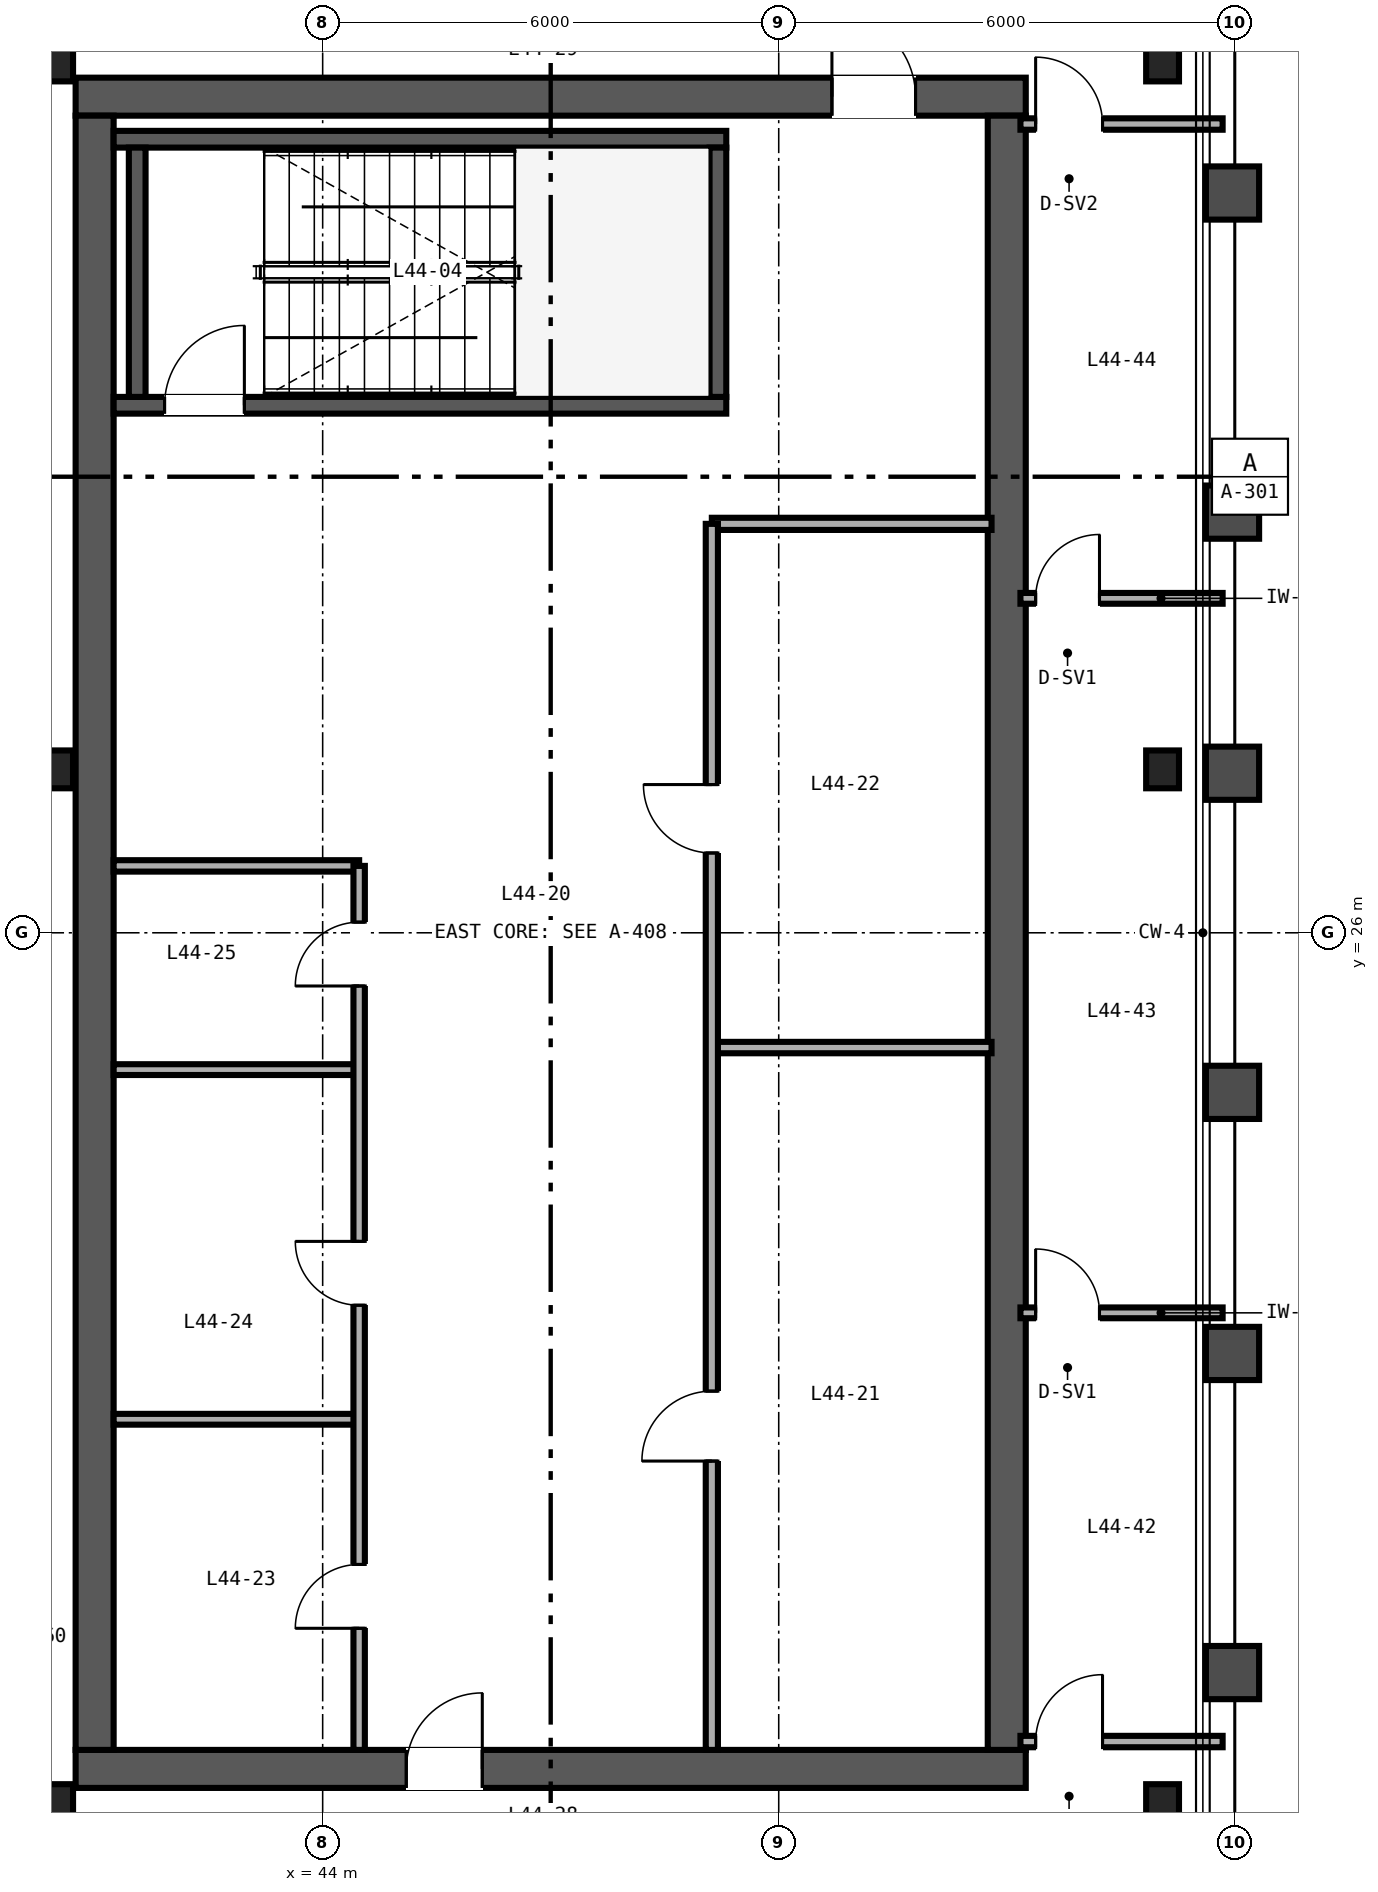
"""IFC4 building model, lengths in metres.
Left out: names, types, materials, properties, quantities, classifications, styles, units other than length and angle.
Written with IfcOpenShell. Run it as: python <this file> out.ifc"""

import sys

from ifc_helpers import new_model, si_unit, direction, frame, frame_2d, origin, origin_2d, place, context, subcontext, project, spatial, rectangle, i_section, extrude, source, transform, mapped, element, fill, save


model = new_model("IFC4")
c1 = context("Model", 3, precision=1e-05, world=origin(), true_north=direction((0.0, 1.0)))
c2 = subcontext(c1, "Body", "Model", "MODEL_VIEW")
j1 = project(units=[si_unit("LENGTHUNIT", "METRE"), si_unit("PLANEANGLEUNIT", "RADIAN")], contexts=[c1])
p1 = place(None, origin())
s1 = spatial("IfcSite", under=j1, at=p1, CompositionType="ELEMENT")
p2 = place(p1, origin())
s2 = spatial("IfcBuilding", under=s1, at=p2, CompositionType="ELEMENT")
p3 = place(p2, frame((0.0, 0.0, 177.6)))
s3 = spatial("IfcBuildingStorey", under=s2, at=p3, CompositionType="ELEMENT", Elevation=177.6)
p4 = place(p3, frame((40.75, 15.0, 0.0), z_axis=(0.0, 0.0, 1.0), x_axis=(1.0, 0.0, 0.0)))
e1 = element("IfcWall", 1, at=p4, inside=s3, PredefinedType="SHEAR", context=c2, shape_type="SweptSolid", body=[
    extrude(rectangle(XDim=12.5, YDim=0.5, at=frame_2d((6.25, 0.0))), origin(), (0.0, 0.0, 1.0), 3.37),
])
p5 = place(p4, frame((4.35, 0.0, 0.0)))
e2 = element("IfcOpeningElement", 2, at=p5, cuts=e1, PredefinedType="OPENING", context=c2, shape_type="SweptSolid", body=[
    extrude(rectangle(XDim=1.0, YDim=2.15, at=frame_2d((0.5, 1.075))), frame((0.0, 0.26, 0.0), z_axis=(0.0, -1.0, 0.0), x_axis=(1.0, 0.0, 0.0)), (0.0, 0.0, 1.0), 0.52),
])
p6 = place(p3, frame((40.75, 37.0, 0.0), z_axis=(0.0, 0.0, 1.0), x_axis=(1.0, 0.0, 0.0)))
e3 = element("IfcWall", 3, at=p6, inside=s3, PredefinedType="SHEAR", context=c2, shape_type="SweptSolid", body=[
    extrude(rectangle(XDim=12.5, YDim=0.5, at=frame_2d((6.25, 0.0))), origin(), (0.0, 0.0, 1.0), 3.37),
])
p7 = place(p6, frame((9.95, 0.0, 0.0)))
e4 = element("IfcOpeningElement", 4, at=p7, cuts=e3, PredefinedType="OPENING", context=c2, shape_type="SweptSolid", body=[
    extrude(rectangle(XDim=1.1, YDim=2.15, at=frame_2d((0.55, 1.075))), frame((0.0, 0.26, 0.0), z_axis=(0.0, -1.0, 0.0), x_axis=(1.0, 0.0, 0.0)), (0.0, 0.0, 1.0), 0.52),
])
for number, where, z_axis, x_axis in (
    (5, (41.0, 15.25, 0.0), (0.0, 0.0, 1.0), (0.0, 1.0, 0.0)),
    (6, (53.0, 15.25, 0.0), (0.0, 0.0, 1.0), (0.0, 1.0, 0.0)),
):
    element("IfcWall", number, at=place(p3, frame(where, z_axis=z_axis, x_axis=x_axis)), inside=s3, PredefinedType="SHEAR", context=c2, shape_type="SweptSolid", body=[
        extrude(rectangle(XDim=21.5, YDim=0.5, at=frame_2d((10.75, 0.0))), origin(), (0.0, 0.0, 1.0), 3.37),
    ])
p8 = place(p3, frame((41.25, 32.94, 0.0), z_axis=(0.0, 0.0, 1.0), x_axis=(1.0, 0.0, 0.0)))
e7 = element("IfcWall", 7, at=p8, inside=s3, PredefinedType="SHEAR", context=c2, shape_type="SweptSolid", body=[
    extrude(rectangle(XDim=8.06, YDim=0.22, at=frame_2d((4.03, 0.0))), origin(), (0.0, 0.0, 1.0), 3.4),
])
p9 = place(p8, frame((0.67, 0.0, 0.0)))
e8 = element("IfcOpeningElement", 8, at=p9, cuts=e7, PredefinedType="OPENING", context=c2, shape_type="SweptSolid", body=[
    extrude(rectangle(XDim=1.05, YDim=2.15, at=frame_2d((0.525, 1.075))), frame((0.0, 0.12, 0.0), z_axis=(0.0, -1.0, 0.0), x_axis=(1.0, 0.0, 0.0)), (0.0, 0.0, 1.0), 0.24),
])
p10 = place(p3, frame((41.25, 36.44, 0.0), z_axis=(0.0, 0.0, 1.0), x_axis=(1.0, 0.0, 0.0)))
e9 = element("IfcWall", 9, at=p10, inside=s3, PredefinedType="SHEAR", context=c2, shape_type="SweptSolid", body=[
    extrude(rectangle(XDim=8.06, YDim=0.22, at=frame_2d((4.03, 0.0))), origin(), (0.0, 0.0, 1.0), 3.4),
])
for number, where, z_axis, x_axis in (
    (10, (41.56, 33.05, 0.0), (0.0, 0.0, 1.0), (0.0, 1.0, 0.0)),
    (11, (49.2, 33.05, 0.0), (0.0, 0.0, 1.0), (0.0, 1.0, 0.0)),
):
    element("IfcWall", number, at=place(p3, frame(where, z_axis=z_axis, x_axis=x_axis)), inside=s3, PredefinedType="SHEAR", context=c2, shape_type="SweptSolid", body=[
        extrude(rectangle(XDim=3.28, YDim=0.22, at=frame_2d((1.64, 0.0))), origin(), (0.0, 0.0, 1.0), 3.4),
    ])
m1 = source(origin(), c2, "Body", "SweptSolid", [
    extrude(i_section(OverallWidth=0.432, OverallDepth=0.498, WebThickness=0.056, FlangeThickness=0.089, FilletRadius=0.025, at=origin_2d()), origin(), (0.0, 0.0, 1.0), 3.37),
])
for number, where, z_axis, x_axis in (
    (12, (40.5, 14.55, 0.0), (0.0, 0.0, 1.0), (1.0, 0.0, 0.0)),
    (13, (55.05, 14.55, 0.0), (0.0, 0.0, 1.0), (1.0, 0.0, 0.0)),
    (14, (40.5, 28.15, 0.0), (0.0, 0.0, 1.0), (1.0, 0.0, 0.0)),
    (15, (55.05, 28.15, 0.0), (0.0, 0.0, 1.0), (1.0, 0.0, 0.0)),
    (16, (40.5, 37.45, 0.0), (0.0, 0.0, 1.0), (1.0, 0.0, 0.0)),
    (17, (55.05, 37.45, 0.0), (0.0, 0.0, 1.0), (1.0, 0.0, 0.0)),
):
    element("IfcColumn", number, at=place(p3, frame(where, z_axis=z_axis, x_axis=x_axis)), inside=s3, PredefinedType="COLUMN", context=c2, shape_type="MappedRepresentation", body=[
        mapped(m1, transform((0.0, 0.0, 0.0), scale=1.0)),
    ])
p11 = place(p3, frame((49.12, 31.38, 0.0), z_axis=(0.0, 0.0, 1.0), x_axis=(1.0, 0.0, 0.0)))
e18 = element("IfcWall", 18, at=p11, inside=s3, PredefinedType="PARTITIONING", context=c2, shape_type="SweptSolid", body=[
    extrude(rectangle(XDim=3.68, YDim=0.16, at=frame_2d((1.84, 0.0))), origin(), (0.0, 0.0, 1.0), 2.47),
])
p12 = place(p3, frame((49.12, 24.49, 0.0), z_axis=(0.0, 0.0, 1.0), x_axis=(1.0, 0.0, 0.0)))
e19 = element("IfcWall", 19, at=p12, inside=s3, PredefinedType="PARTITIONING", context=c2, shape_type="SweptSolid", body=[
    extrude(rectangle(XDim=3.68, YDim=0.15, at=frame_2d((1.84, 0.0))), origin(), (0.0, 0.0, 1.0), 3.37),
])
p13 = place(p3, frame((49.12, 15.25, 0.0), z_axis=(0.0, 0.0, 1.0), x_axis=(0.0, 1.0, 0.0)))
e20 = element("IfcWall", 20, at=p13, inside=s3, PredefinedType="PARTITIONING", context=c2, shape_type="SweptSolid", body=[
    extrude(rectangle(XDim=16.13, YDim=0.16, at=frame_2d((8.065, 0.0))), origin(), (0.0, 0.0, 1.0), 2.443),
])
p14 = place(p13, frame((3.8, 0.0, 0.0)))
e21 = element("IfcOpeningElement", 21, at=p14, cuts=e20, PredefinedType="OPENING", context=c2, shape_type="SweptSolid", body=[
    extrude(rectangle(XDim=0.92, YDim=2.15, at=frame_2d((0.46, 1.075))), frame((0.0, 0.09, 0.0), z_axis=(0.0, -1.0, 0.0), x_axis=(1.0, 0.0, 0.0)), (0.0, 0.0, 1.0), 0.18),
])
p15 = place(p13, frame((11.8, 0.0, 0.0)))
e22 = element("IfcOpeningElement", 22, at=p15, cuts=e20, PredefinedType="OPENING", context=c2, shape_type="SweptSolid", body=[
    extrude(rectangle(XDim=0.9, YDim=2.15, at=frame_2d((0.45, 1.075))), frame((0.0, 0.09, 0.0), z_axis=(0.0, -1.0, 0.0), x_axis=(1.0, 0.0, 0.0)), (0.0, 0.0, 1.0), 0.18),
])
p16 = place(p3, frame((41.25, 26.88, 0.0), z_axis=(0.0, 0.0, 1.0), x_axis=(1.0, 0.0, 0.0)))
e23 = element("IfcWall", 23, at=p16, inside=s3, PredefinedType="PARTITIONING", context=c2, shape_type="SweptSolid", body=[
    extrude(rectangle(XDim=3.23, YDim=0.15, at=frame_2d((1.615, 0.0))), origin(), (0.0, 0.0, 1.0), 3.37),
])
for number, where, z_axis, x_axis in (
    (24, (41.25, 19.6, 0.0), (0.0, 0.0, 1.0), (1.0, 0.0, 0.0)),
    (25, (41.25, 24.2, 0.0), (0.0, 0.0, 1.0), (1.0, 0.0, 0.0)),
):
    element("IfcWall", number, at=place(p3, frame(where, z_axis=z_axis, x_axis=x_axis)), inside=s3, PredefinedType="PARTITIONING", context=c2, shape_type="SweptSolid", body=[
        extrude(rectangle(XDim=3.23, YDim=0.142, at=frame_2d((1.615, 0.0))), origin(), (0.0, 0.0, 1.0), 3.37),
    ])
p17 = place(p3, frame((44.48, 15.25, 0.0), z_axis=(0.0, 0.0, 1.0), x_axis=(0.0, 1.0, 0.0)))
e26 = element("IfcWall", 26, at=p17, inside=s3, PredefinedType="PARTITIONING", context=c2, shape_type="SweptSolid", body=[
    extrude(rectangle(XDim=11.63, YDim=0.15, at=frame_2d((5.815, 0.0))), origin(), (0.0, 0.0, 1.0), 3.37),
])
p18 = place(p17, frame((1.6, 0.0, 0.0)))
e27 = element("IfcOpeningElement", 27, at=p18, cuts=e26, PredefinedType="OPENING", context=c2, shape_type="SweptSolid", body=[
    extrude(rectangle(XDim=0.84, YDim=2.1, at=frame_2d((0.42, 1.05))), frame((0.0, 0.085, 0.0), z_axis=(0.0, -1.0, 0.0), x_axis=(1.0, 0.0, 0.0)), (0.0, 0.0, 1.0), 0.17),
])
p19 = place(p17, frame((5.85, 0.0, 0.0)))
e28 = element("IfcOpeningElement", 28, at=p19, cuts=e26, PredefinedType="OPENING", context=c2, shape_type="SweptSolid", body=[
    extrude(rectangle(XDim=0.84, YDim=2.1, at=frame_2d((0.42, 1.05))), frame((0.0, 0.085, 0.0), z_axis=(0.0, -1.0, 0.0), x_axis=(1.0, 0.0, 0.0)), (0.0, 0.0, 1.0), 0.17),
])
p20 = place(p17, frame((10.05, 0.0, 0.0)))
e29 = element("IfcOpeningElement", 29, at=p20, cuts=e26, PredefinedType="OPENING", context=c2, shape_type="SweptSolid", body=[
    extrude(rectangle(XDim=0.84, YDim=2.1, at=frame_2d((0.42, 1.05))), frame((0.0, 0.085, 0.0), z_axis=(0.0, -1.0, 0.0), x_axis=(1.0, 0.0, 0.0)), (0.0, 0.0, 1.0), 0.17),
])
p21 = place(p3, frame((53.18, 15.36, 0.0), z_axis=(0.0, 0.0, 1.0), x_axis=(1.0, 0.0, 0.0)))
e30 = element("IfcWall", 30, at=p21, inside=s3, PredefinedType="PARTITIONING", context=c2, shape_type="SweptSolid", body=[
    extrude(rectangle(XDim=2.66, YDim=0.15, at=frame_2d((1.33, 0.0))), origin(), (0.0, 0.0, 1.0), 2.591),
])
p22 = place(p21, frame((0.2, 0.0, 0.0)))
e31 = element("IfcOpeningElement", 31, at=p22, cuts=e30, PredefinedType="OPENING", context=c2, shape_type="SweptSolid", body=[
    extrude(rectangle(XDim=0.88, YDim=2.15, at=frame_2d((0.44, 1.075))), frame((0.0, 0.085, 0.0), z_axis=(0.0, -1.0, 0.0), x_axis=(1.0, 0.0, 0.0)), (0.0, 0.0, 1.0), 0.17),
])
p23 = place(p3, frame((53.18, 36.64, 0.0), z_axis=(0.0, 0.0, 1.0), x_axis=(1.0, 0.0, 0.0)))
e32 = element("IfcWall", 32, at=p23, inside=s3, PredefinedType="PARTITIONING", context=c2, shape_type="SweptSolid", body=[
    extrude(rectangle(XDim=2.66, YDim=0.15, at=frame_2d((1.33, 0.0))), origin(), (0.0, 0.0, 1.0), 2.753),
])
p24 = place(p23, frame((0.2, 0.0, 0.0)))
e33 = element("IfcOpeningElement", 33, at=p24, cuts=e32, PredefinedType="OPENING", context=c2, shape_type="SweptSolid", body=[
    extrude(rectangle(XDim=0.88, YDim=2.15, at=frame_2d((0.44, 1.075))), frame((0.0, 0.085, 0.0), z_axis=(0.0, -1.0, 0.0), x_axis=(1.0, 0.0, 0.0)), (0.0, 0.0, 1.0), 0.17),
])
p25 = place(p3, frame((53.18, 21.0, 0.0), z_axis=(0.0, 0.0, 1.0), x_axis=(1.0, 0.0, 0.0)))
e34 = element("IfcWall", 34, at=p25, inside=s3, PredefinedType="PARTITIONING", context=c2, shape_type="SweptSolid", body=[
    extrude(rectangle(XDim=2.66, YDim=0.142, at=frame_2d((1.33, 0.0))), origin(), (0.0, 0.0, 1.0), 2.591),
])
p26 = place(p25, frame((0.2, 0.0, 0.0)))
e35 = element("IfcOpeningElement", 35, at=p26, cuts=e34, PredefinedType="OPENING", context=c2, shape_type="SweptSolid", body=[
    extrude(rectangle(XDim=0.84, YDim=2.1, at=frame_2d((0.42, 1.05))), frame((0.0, 0.081, 0.0), z_axis=(0.0, -1.0, 0.0), x_axis=(1.0, 0.0, 0.0)), (0.0, 0.0, 1.0), 0.162),
])
p27 = place(p3, frame((53.18, 30.4, 0.0), z_axis=(0.0, 0.0, 1.0), x_axis=(1.0, 0.0, 0.0)))
e36 = element("IfcWall", 36, at=p27, inside=s3, PredefinedType="PARTITIONING", context=c2, shape_type="SweptSolid", body=[
    extrude(rectangle(XDim=2.66, YDim=0.142, at=frame_2d((1.33, 0.0))), origin(), (0.0, 0.0, 1.0), 2.753),
])
p28 = place(p27, frame((0.2, 0.0, 0.0)))
e37 = element("IfcOpeningElement", 37, at=p28, cuts=e36, PredefinedType="OPENING", context=c2, shape_type="SweptSolid", body=[
    extrude(rectangle(XDim=0.84, YDim=2.1, at=frame_2d((0.42, 1.05))), frame((0.0, 0.081, 0.0), z_axis=(0.0, -1.0, 0.0), x_axis=(1.0, 0.0, 0.0)), (0.0, 0.0, 1.0), 0.162),
])
m2 = source(origin(), c2, "Body", "SweptSolid", [
    extrude(rectangle(XDim=1.05, YDim=2.15, at=frame_2d((0.525, 1.075))), frame((0.0, 0.025, 0.0), z_axis=(0.0, -1.0, 0.0), x_axis=(1.0, 0.0, 0.0)), (0.0, 0.0, 1.0), 0.05),
])
p29 = place(p9, origin())
e38 = element("IfcDoor", 38, at=p29, inside=s3, OperationType="SINGLE_SWING_RIGHT", PredefinedType="DOOR", context=c2, shape_type="MappedRepresentation", body=[
    mapped(m2, transform((0.0, 0.0, 0.0), scale=1.0)),
])
fill(e8, e38)
m3 = source(origin(), c2, "Body", "SweptSolid", [
    extrude(rectangle(XDim=1.0, YDim=2.15, at=frame_2d((0.5, 1.075))), frame((0.0, 0.025, 0.0), z_axis=(0.0, -1.0, 0.0), x_axis=(1.0, 0.0, 0.0)), (0.0, 0.0, 1.0), 0.05),
])
p30 = place(p5, origin())
e39 = element("IfcDoor", 39, at=p30, inside=s3, OperationType="SINGLE_SWING_RIGHT", PredefinedType="DOOR", context=c2, shape_type="MappedRepresentation", body=[
    mapped(m3, transform((0.0, 0.0, 0.0), scale=1.0)),
])
fill(e2, e39)
m4 = source(origin(), c2, "Body", "SweptSolid", [
    extrude(rectangle(XDim=1.1, YDim=2.15, at=frame_2d((0.55, 1.075))), frame((0.0, 0.025, 0.0), z_axis=(0.0, -1.0, 0.0), x_axis=(1.0, 0.0, 0.0)), (0.0, 0.0, 1.0), 0.05),
])
p31 = place(p7, origin())
e40 = element("IfcDoor", 40, at=p31, inside=s3, OperationType="SINGLE_SWING_LEFT", PredefinedType="DOOR", context=c2, shape_type="MappedRepresentation", body=[
    mapped(m4, transform((0.0, 0.0, 0.0), scale=1.0)),
])
fill(e4, e40)
m5 = source(origin(), c2, "Body", "SweptSolid", [
    extrude(rectangle(XDim=0.92, YDim=2.15, at=frame_2d((0.46, 1.075))), frame((0.0, 0.025, 0.0), z_axis=(0.0, -1.0, 0.0), x_axis=(1.0, 0.0, 0.0)), (0.0, 0.0, 1.0), 0.05),
])
p32 = place(p14, origin())
e41 = element("IfcDoor", 41, at=p32, inside=s3, OperationType="SINGLE_SWING_LEFT", PredefinedType="DOOR", context=c2, shape_type="MappedRepresentation", body=[
    mapped(m5, transform((0.0, 0.0, 0.0), scale=1.0)),
])
fill(e21, e41)
m6 = source(origin(), c2, "Body", "SweptSolid", [
    extrude(rectangle(XDim=0.9, YDim=2.15, at=frame_2d((0.45, 1.075))), frame((0.0, 0.025, 0.0), z_axis=(0.0, -1.0, 0.0), x_axis=(1.0, 0.0, 0.0)), (0.0, 0.0, 1.0), 0.05),
])
p33 = place(p15, origin())
e42 = element("IfcDoor", 42, at=p33, inside=s3, OperationType="SINGLE_SWING_RIGHT", PredefinedType="DOOR", context=c2, shape_type="MappedRepresentation", body=[
    mapped(m6, transform((0.0, 0.0, 0.0), scale=1.0)),
])
fill(e22, e42)
m7 = source(origin(), c2, "Body", "SweptSolid", [
    extrude(rectangle(XDim=0.84, YDim=2.1, at=frame_2d((0.42, 1.05))), frame((0.0, 0.025, 0.0), z_axis=(0.0, -1.0, 0.0), x_axis=(1.0, 0.0, 0.0)), (0.0, 0.0, 1.0), 0.05),
])
p34 = place(p18, origin())
e43 = element("IfcDoor", 43, at=p34, inside=s3, OperationType="SINGLE_SWING_LEFT", PredefinedType="DOOR", context=c2, shape_type="MappedRepresentation", body=[
    mapped(m7, transform((0.0, 0.0, 0.0), scale=1.0)),
])
fill(e27, e43)
p35 = place(p19, origin())
e44 = element("IfcDoor", 44, at=p35, inside=s3, OperationType="SINGLE_SWING_RIGHT", PredefinedType="DOOR", context=c2, shape_type="MappedRepresentation", body=[
    mapped(m7, transform((0.0, 0.0, 0.0), scale=1.0)),
])
fill(e28, e44)
p36 = place(p20, origin())
e45 = element("IfcDoor", 45, at=p36, inside=s3, OperationType="SINGLE_SWING_LEFT", PredefinedType="DOOR", context=c2, shape_type="MappedRepresentation", body=[
    mapped(m7, transform((0.0, 0.0, 0.0), scale=1.0)),
])
fill(e29, e45)
m8 = source(origin(), c2, "Body", "SweptSolid", [
    extrude(rectangle(XDim=0.88, YDim=2.15, at=frame_2d((0.44, 1.075))), frame((0.0, 0.025, 0.0), z_axis=(0.0, -1.0, 0.0), x_axis=(1.0, 0.0, 0.0)), (0.0, 0.0, 1.0), 0.05),
])
p37 = place(p22, origin())
e46 = element("IfcDoor", 46, at=p37, inside=s3, OperationType="SINGLE_SWING_RIGHT", PredefinedType="DOOR", context=c2, shape_type="MappedRepresentation", body=[
    mapped(m8, transform((0.0, 0.0, 0.0), scale=1.0)),
])
fill(e31, e46)
p38 = place(p24, origin())
e47 = element("IfcDoor", 47, at=p38, inside=s3, OperationType="SINGLE_SWING_LEFT", PredefinedType="DOOR", context=c2, shape_type="MappedRepresentation", body=[
    mapped(m8, transform((0.0, 0.0, 0.0), scale=1.0)),
])
fill(e33, e47)
p39 = place(p26, origin())
e48 = element("IfcDoor", 48, at=p39, inside=s3, OperationType="SINGLE_SWING_LEFT", PredefinedType="DOOR", context=c2, shape_type="MappedRepresentation", body=[
    mapped(m7, transform((0.0, 0.0, 0.0), scale=1.0)),
])
fill(e35, e48)
p40 = place(p28, origin())
e49 = element("IfcDoor", 49, at=p40, inside=s3, OperationType="SINGLE_SWING_RIGHT", PredefinedType="DOOR", context=c2, shape_type="MappedRepresentation", body=[
    mapped(m7, transform((0.0, 0.0, 0.0), scale=1.0)),
])
fill(e37, e49)
save(model, sys.argv[1])
